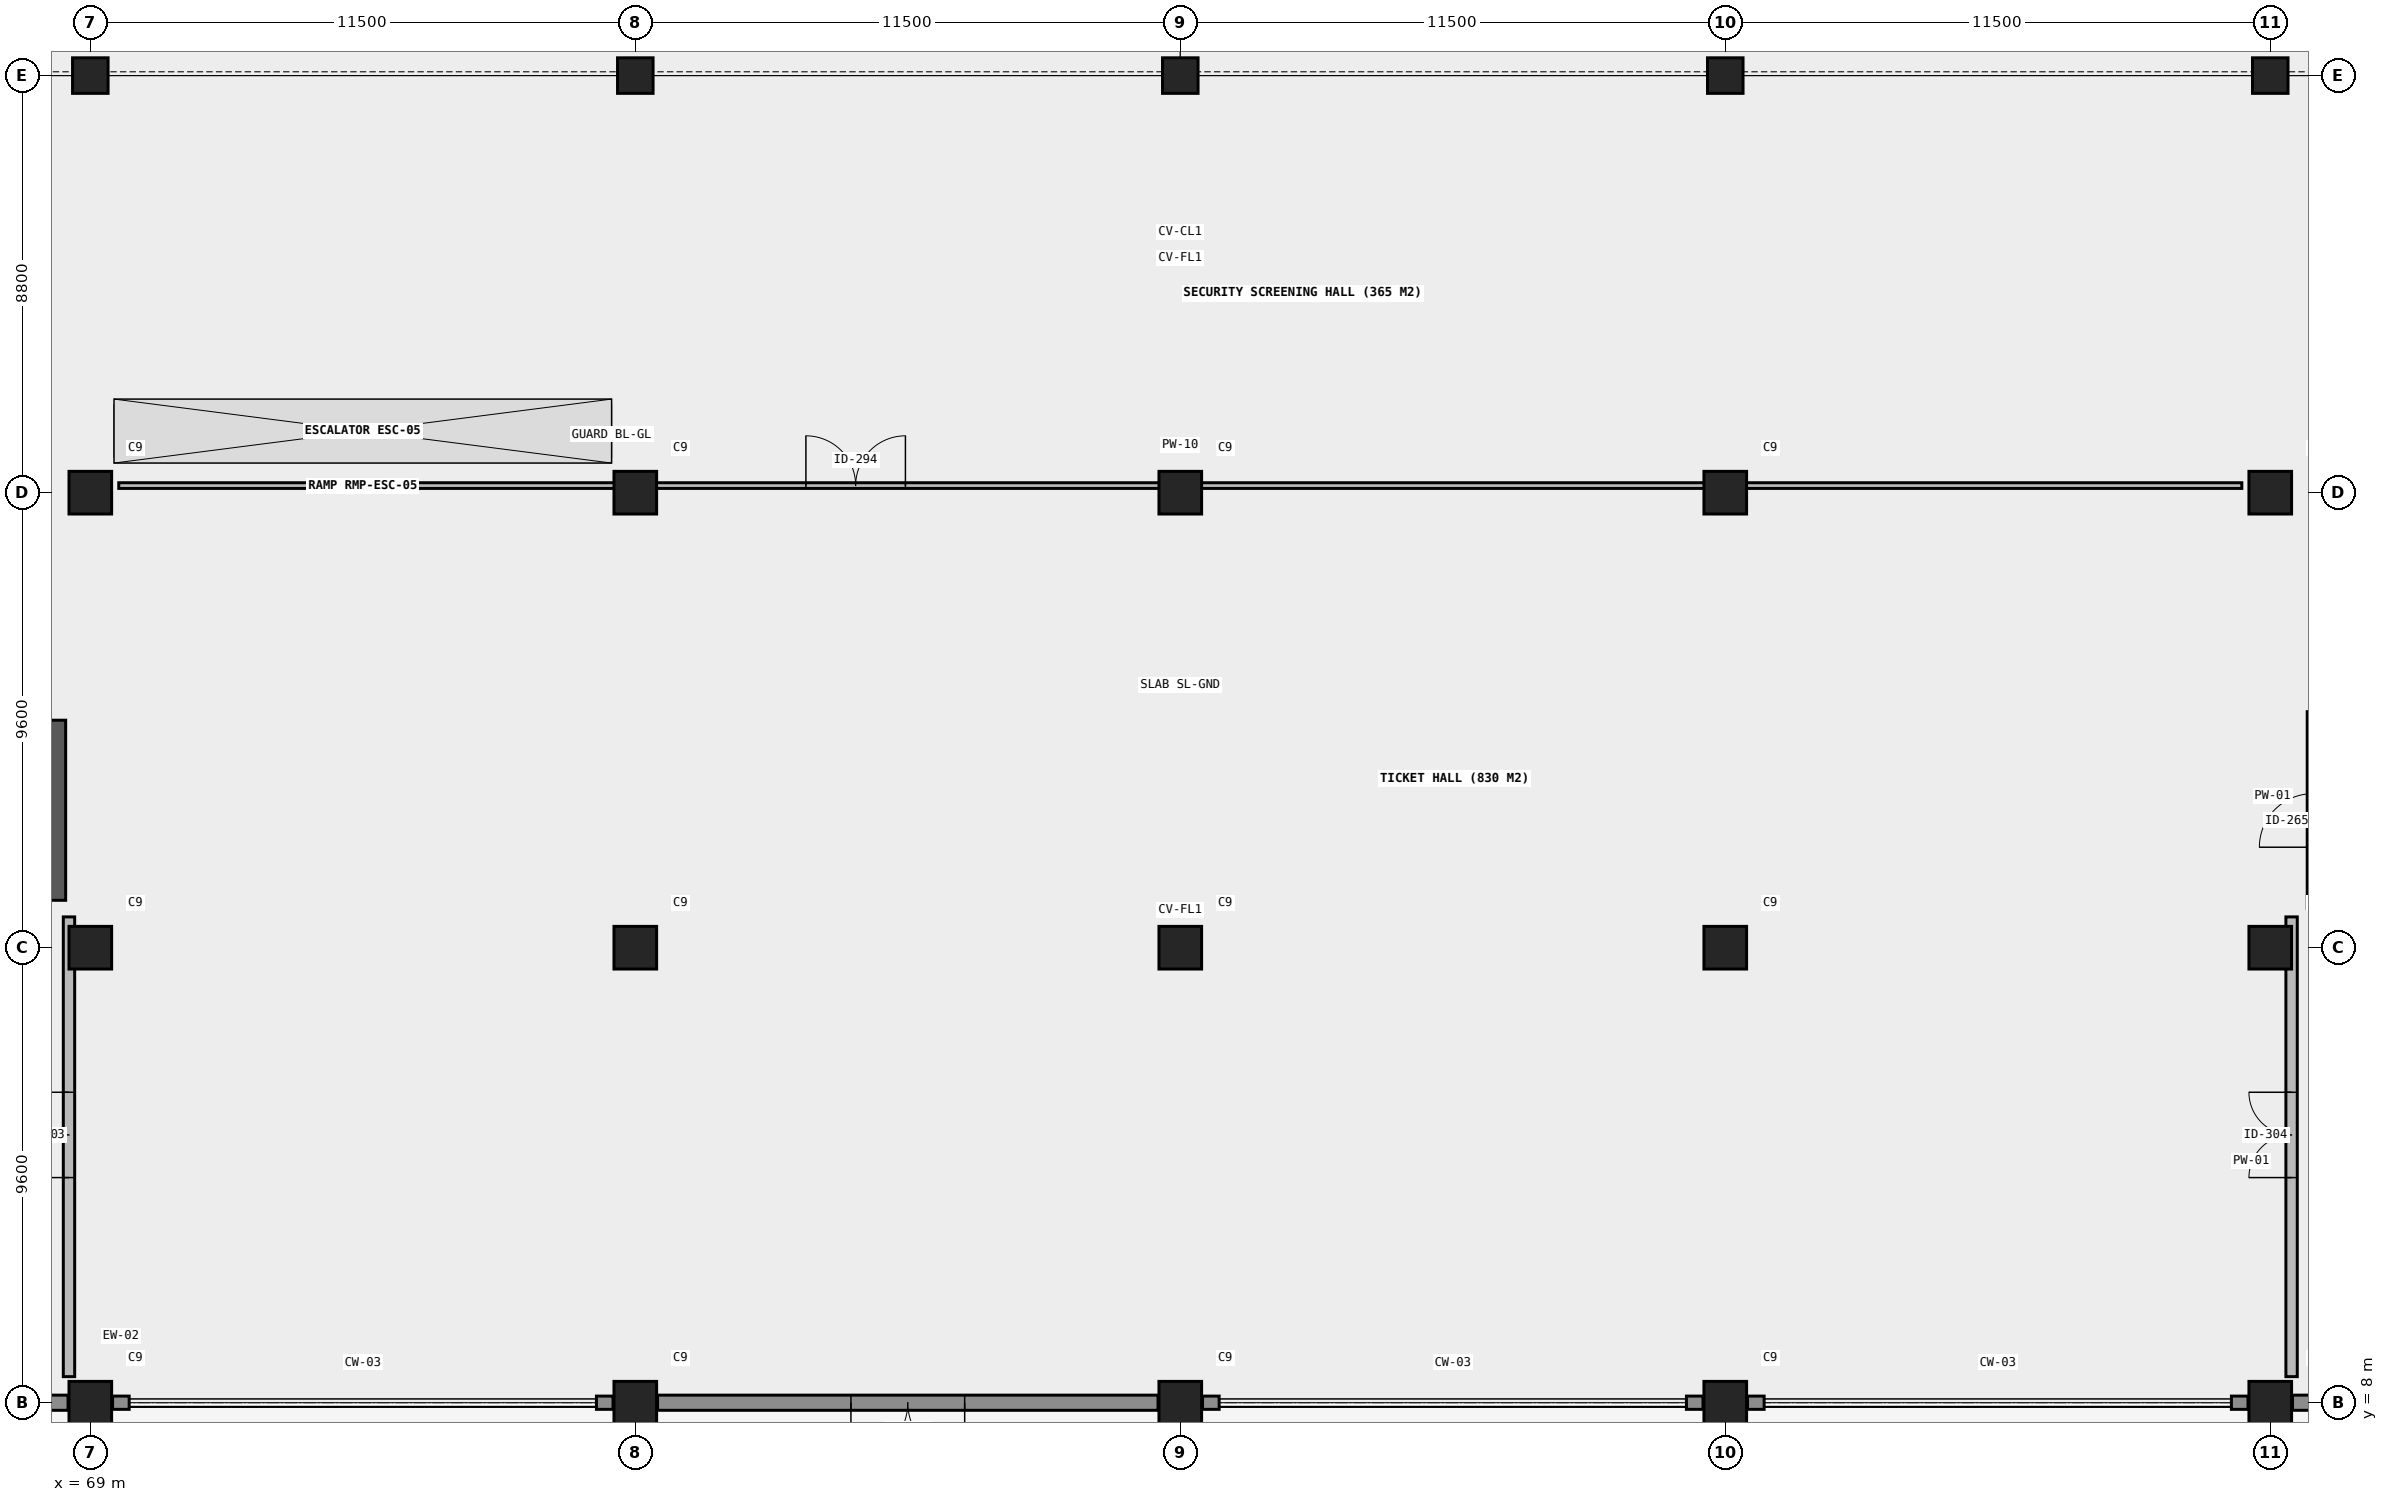
"""IFC4 building model, lengths in metres.
Left out: names, types, materials, properties, quantities, classifications, styles, units other than length and angle.
Written with IfcOpenShell. Run it as: python <this file> out.ifc"""

import sys

from ifc_helpers import new_model, si_unit, direction, frame, frame_2d, origin, origin_2d, place, context, subcontext, project, spatial, rectangle, circle, extrude, element, fill, save


model = new_model("IFC4")
c1 = context("Model", 3, precision=1e-05, world=origin(), true_north=direction((0.0, 1.0)))
c2 = subcontext(c1, "Body", "Model", "MODEL_VIEW")
j1 = project(units=[si_unit("LENGTHUNIT", "METRE"), si_unit("PLANEANGLEUNIT", "RADIAN")], contexts=[c1])
p1 = place(None, origin())
s1 = spatial("IfcSite", under=j1, at=p1, CompositionType="ELEMENT")
p2 = place(p1, origin())
s2 = spatial("IfcBuilding", under=s1, at=p2, CompositionType="ELEMENT")
p3 = place(p2, origin())
s3 = spatial("IfcBuildingStorey", under=s2, at=p3, CompositionType="ELEMENT", Elevation=0.0)
for number, where, z_axis, x_axis in (
    (1, (69.0, 8.0, 0.0), (0.0, 0.0, 1.0), (1.0, 0.0, 0.0)),
    (2, (69.0, 17.6, 0.0), (0.0, 0.0, 1.0), (1.0, 0.0, 0.0)),
    (3, (69.0, 27.2, 0.0), (0.0, 0.0, 1.0), (1.0, 0.0, 0.0)),
):
    element("IfcColumn", number, at=place(p3, frame(where, z_axis=z_axis, x_axis=x_axis)), inside=s3, PredefinedType="COLUMN", context=c2, shape_type="SweptSolid", body=[
        extrude(circle(Radius=0.45, at=origin_2d()), origin(), (0.0, 0.0, 1.0), 4.2),
    ])
p4 = place(p3, frame((69.0, 36.0, 0.0), z_axis=(0.0, 0.0, 1.0), x_axis=(1.0, 0.0, 0.0)))
e4 = element("IfcColumn", 4, at=p4, inside=s3, PredefinedType="COLUMN", context=c2, shape_type="SweptSolid", body=[
    extrude(rectangle(XDim=0.75, YDim=0.75, at=origin_2d()), origin(), (0.0, 0.0, 1.0), 4.2),
])
for number, where, z_axis, x_axis in (
    (5, (80.5, 8.0, 0.0), (0.0, 0.0, 1.0), (1.0, 0.0, 0.0)),
    (6, (80.5, 17.6, 0.0), (0.0, 0.0, 1.0), (1.0, 0.0, 0.0)),
    (7, (80.5, 27.2, 0.0), (0.0, 0.0, 1.0), (1.0, 0.0, 0.0)),
):
    element("IfcColumn", number, at=place(p3, frame(where, z_axis=z_axis, x_axis=x_axis)), inside=s3, PredefinedType="COLUMN", context=c2, shape_type="SweptSolid", body=[
        extrude(circle(Radius=0.45, at=origin_2d()), origin(), (0.0, 0.0, 1.0), 4.2),
    ])
p5 = place(p3, frame((80.5, 36.0, 0.0), z_axis=(0.0, 0.0, 1.0), x_axis=(1.0, 0.0, 0.0)))
e8 = element("IfcColumn", 8, at=p5, inside=s3, PredefinedType="COLUMN", context=c2, shape_type="SweptSolid", body=[
    extrude(rectangle(XDim=0.75, YDim=0.75, at=origin_2d()), origin(), (0.0, 0.0, 1.0), 4.2),
])
for number, where, z_axis, x_axis in (
    (9, (92.0, 8.0, 0.0), (0.0, 0.0, 1.0), (1.0, 0.0, 0.0)),
    (10, (92.0, 17.6, 0.0), (0.0, 0.0, 1.0), (1.0, 0.0, 0.0)),
    (11, (92.0, 27.2, 0.0), (0.0, 0.0, 1.0), (1.0, 0.0, 0.0)),
):
    element("IfcColumn", number, at=place(p3, frame(where, z_axis=z_axis, x_axis=x_axis)), inside=s3, PredefinedType="COLUMN", context=c2, shape_type="SweptSolid", body=[
        extrude(circle(Radius=0.45, at=origin_2d()), origin(), (0.0, 0.0, 1.0), 4.2),
    ])
p6 = place(p3, frame((92.0, 36.0, 0.0), z_axis=(0.0, 0.0, 1.0), x_axis=(1.0, 0.0, 0.0)))
e12 = element("IfcColumn", 12, at=p6, inside=s3, PredefinedType="COLUMN", context=c2, shape_type="SweptSolid", body=[
    extrude(rectangle(XDim=0.75, YDim=0.75, at=origin_2d()), origin(), (0.0, 0.0, 1.0), 4.2),
])
for number, where, z_axis, x_axis in (
    (13, (103.5, 8.0, 0.0), (0.0, 0.0, 1.0), (1.0, 0.0, 0.0)),
    (14, (103.5, 17.6, 0.0), (0.0, 0.0, 1.0), (1.0, 0.0, 0.0)),
    (15, (103.5, 27.2, 0.0), (0.0, 0.0, 1.0), (1.0, 0.0, 0.0)),
):
    element("IfcColumn", number, at=place(p3, frame(where, z_axis=z_axis, x_axis=x_axis)), inside=s3, PredefinedType="COLUMN", context=c2, shape_type="SweptSolid", body=[
        extrude(circle(Radius=0.45, at=origin_2d()), origin(), (0.0, 0.0, 1.0), 4.2),
    ])
p7 = place(p3, frame((103.5, 36.0, 0.0), z_axis=(0.0, 0.0, 1.0), x_axis=(1.0, 0.0, 0.0)))
e16 = element("IfcColumn", 16, at=p7, inside=s3, PredefinedType="COLUMN", context=c2, shape_type="SweptSolid", body=[
    extrude(rectangle(XDim=0.75, YDim=0.75, at=origin_2d()), origin(), (0.0, 0.0, 1.0), 4.2),
])
for number, where, z_axis, x_axis in (
    (17, (115.0, 8.0, 0.0), (0.0, 0.0, 1.0), (1.0, 0.0, 0.0)),
    (18, (115.0, 17.6, 0.0), (0.0, 0.0, 1.0), (1.0, 0.0, 0.0)),
    (19, (115.0, 27.2, 0.0), (0.0, 0.0, 1.0), (1.0, 0.0, 0.0)),
):
    element("IfcColumn", number, at=place(p3, frame(where, z_axis=z_axis, x_axis=x_axis)), inside=s3, PredefinedType="COLUMN", context=c2, shape_type="SweptSolid", body=[
        extrude(circle(Radius=0.45, at=origin_2d()), origin(), (0.0, 0.0, 1.0), 4.2),
    ])
p8 = place(p3, frame((115.0, 36.0, 0.0), z_axis=(0.0, 0.0, 1.0), x_axis=(1.0, 0.0, 0.0)))
e20 = element("IfcColumn", 20, at=p8, inside=s3, PredefinedType="COLUMN", context=c2, shape_type="SweptSolid", body=[
    extrude(rectangle(XDim=0.75, YDim=0.75, at=origin_2d()), origin(), (0.0, 0.0, 1.0), 4.2),
])
p9 = place(p3, frame((68.29, 18.6, 0.0), z_axis=(0.0, 0.0, 1.0), x_axis=(0.0, 1.0, 0.0)))
e21 = element("IfcWall", 21, at=p9, inside=s3, PredefinedType="SHEAR", context=c2, shape_type="SweptSolid", body=[
    extrude(rectangle(XDim=3.8, YDim=0.38, at=frame_2d((1.9, 0.0))), origin(), (0.0, 0.0, 1.0), 4.2),
])
p10 = place(p3, frame((57.97, 8.0, 0.0), z_axis=(0.0, 0.0, 1.0), x_axis=(1.0, 0.0, 0.0)))
e22 = element("IfcWall", 22, at=p10, inside=s3, PredefinedType="SOLIDWALL", context=c2, shape_type="SweptSolid", body=[
    extrude(rectangle(XDim=10.56, YDim=0.32, at=frame_2d((5.28, 0.0))), origin(), (0.0, 0.0, 1.0), 3.0),
])
p11 = place(p10, frame((4.08, 0.0, 0.0)))
e23 = element("IfcOpeningElement", 23, at=p11, cuts=e22, PredefinedType="OPENING", context=c2, shape_type="SweptSolid", body=[
    extrude(rectangle(XDim=2.4, YDim=2.6, at=frame_2d((1.2, 1.3))), frame((0.0, 0.17, 0.0), z_axis=(0.0, -1.0, 0.0), x_axis=(1.0, 0.0, 0.0)), (0.0, 0.0, 1.0), 0.34),
])
for number, where, z_axis, x_axis in (
    (24, (69.47, 8.0, 0.0), (0.0, 0.0, 1.0), (1.0, 0.0, 0.0)),
    (25, (79.68, 8.0, 0.0), (0.0, 0.0, 1.0), (1.0, 0.0, 0.0)),
):
    element("IfcWall", number, at=place(p3, frame(where, z_axis=z_axis, x_axis=x_axis)), inside=s3, PredefinedType="SOLIDWALL", context=c2, shape_type="SweptSolid", body=[
        extrude(rectangle(XDim=0.35, YDim=0.28, at=frame_2d((0.175, 0.0))), origin(), (0.0, 0.0, 1.0), 3.88),
    ])
p12 = place(p3, frame((80.97, 8.0, 0.0), z_axis=(0.0, 0.0, 1.0), x_axis=(1.0, 0.0, 0.0)))
e26 = element("IfcWall", 26, at=p12, inside=s3, PredefinedType="SOLIDWALL", context=c2, shape_type="SweptSolid", body=[
    extrude(rectangle(XDim=10.56, YDim=0.32, at=frame_2d((5.28, 0.0))), origin(), (0.0, 0.0, 1.0), 3.88),
])
p13 = place(p12, frame((4.08, 0.0, 0.0)))
e27 = element("IfcOpeningElement", 27, at=p13, cuts=e26, PredefinedType="OPENING", context=c2, shape_type="SweptSolid", body=[
    extrude(rectangle(XDim=2.4, YDim=2.6, at=frame_2d((1.2, 1.3))), frame((0.0, 0.17, 0.0), z_axis=(0.0, -1.0, 0.0), x_axis=(1.0, 0.0, 0.0)), (0.0, 0.0, 1.0), 0.34),
])
for number, where, z_axis, x_axis in (
    (28, (92.47, 8.0, 0.0), (0.0, 0.0, 1.0), (1.0, 0.0, 0.0)),
    (29, (102.68, 8.0, 0.0), (0.0, 0.0, 1.0), (1.0, 0.0, 0.0)),
    (30, (103.97, 8.0, 0.0), (0.0, 0.0, 1.0), (1.0, 0.0, 0.0)),
    (31, (114.18, 8.0, 0.0), (0.0, 0.0, 1.0), (1.0, 0.0, 0.0)),
):
    element("IfcWall", number, at=place(p3, frame(where, z_axis=z_axis, x_axis=x_axis)), inside=s3, PredefinedType="SOLIDWALL", context=c2, shape_type="SweptSolid", body=[
        extrude(rectangle(XDim=0.35, YDim=0.28, at=frame_2d((0.175, 0.0))), origin(), (0.0, 0.0, 1.0), 3.88),
    ])
p14 = place(p3, frame((115.47, 8.0, 0.0), z_axis=(0.0, 0.0, 1.0), x_axis=(1.0, 0.0, 0.0)))
e32 = element("IfcWall", 32, at=p14, inside=s3, PredefinedType="SOLIDWALL", context=c2, shape_type="SweptSolid", body=[
    extrude(rectangle(XDim=10.56, YDim=0.32, at=frame_2d((5.28, 0.0))), origin(), (0.0, 0.0, 1.0), 3.0),
])
p15 = place(p14, frame((4.08, 0.0, 0.0)))
e33 = element("IfcOpeningElement", 33, at=p15, cuts=e32, PredefinedType="OPENING", context=c2, shape_type="SweptSolid", body=[
    extrude(rectangle(XDim=2.4, YDim=2.6, at=frame_2d((1.2, 1.3))), frame((0.0, 0.17, 0.0), z_axis=(0.0, -1.0, 0.0), x_axis=(1.0, 0.0, 0.0)), (0.0, 0.0, 1.0), 0.34),
])
p16 = place(p3, frame((115.9, 18.42, 0.0), z_axis=(0.0, 0.0, 1.0), x_axis=(0.0, 1.0, 0.0)))
e34 = element("IfcWall", 34, at=p16, inside=s3, PredefinedType="SOLIDWALL", context=c2, shape_type="SweptSolid", body=[
    extrude(rectangle(XDim=4.16, YDim=0.24, at=frame_2d((2.08, 0.0))), origin(), (0.0, 0.0, 1.0), 3.88),
])
p17 = place(p16, frame((1.3, 0.0, 0.0)))
e35 = element("IfcOpeningElement", 35, at=p17, cuts=e34, PredefinedType="OPENING", context=c2, shape_type="SweptSolid", body=[
    extrude(rectangle(XDim=1.13, YDim=2.15, at=frame_2d((0.565, 1.075))), frame((0.0, 0.13, 0.0), z_axis=(0.0, -1.0, 0.0), x_axis=(1.0, 0.0, 0.0)), (0.0, 0.0, 1.0), 0.26),
])
p18 = place(p3, frame((69.6, 27.35, 0.0), z_axis=(0.0, 0.0, 1.0), x_axis=(1.0, 0.0, 0.0)))
e36 = element("IfcWall", 36, at=p18, inside=s3, PredefinedType="MOVABLE", context=c2, shape_type="SweptSolid", body=[
    extrude(rectangle(XDim=44.8, YDim=0.12, at=frame_2d((22.4, 0.0))), origin(), (0.0, 0.0, 1.0), 3.0),
])
p19 = place(p18, frame((14.5, 0.0, 0.0)))
e37 = element("IfcOpeningElement", 37, at=p19, cuts=e36, PredefinedType="OPENING", context=c2, shape_type="SweptSolid", body=[
    extrude(rectangle(XDim=2.1, YDim=2.35, at=frame_2d((1.05, 1.175))), frame((0.0, 0.07, 0.0), z_axis=(0.0, -1.0, 0.0), x_axis=(1.0, 0.0, 0.0)), (0.0, 0.0, 1.0), 0.14),
])
p20 = place(p3, frame((68.55, 8.55, 0.0), z_axis=(0.0, 0.0, 1.0), x_axis=(0.0, 1.0, 0.0)))
e38 = element("IfcWall", 38, at=p20, inside=s3, PredefinedType="SOLIDWALL", context=c2, shape_type="SweptSolid", body=[
    extrude(rectangle(XDim=9.7, YDim=0.24, at=frame_2d((4.85, 0.0))), origin(), (0.0, 0.0, 1.0), 3.88),
])
p21 = place(p20, frame((4.2, 0.0, 0.0)))
e39 = element("IfcOpeningElement", 39, at=p21, cuts=e38, PredefinedType="OPENING", context=c2, shape_type="SweptSolid", body=[
    extrude(rectangle(XDim=1.8, YDim=2.2, at=frame_2d((0.9, 1.1))), frame((0.0, 0.13, 0.0), z_axis=(0.0, -1.0, 0.0), x_axis=(1.0, 0.0, 0.0)), (0.0, 0.0, 1.0), 0.26),
])
p22 = place(p3, frame((115.45, 8.55, 0.0), z_axis=(0.0, 0.0, 1.0), x_axis=(0.0, 1.0, 0.0)))
e40 = element("IfcWall", 40, at=p22, inside=s3, PredefinedType="SOLIDWALL", context=c2, shape_type="SweptSolid", body=[
    extrude(rectangle(XDim=9.7, YDim=0.24, at=frame_2d((4.85, 0.0))), origin(), (0.0, 0.0, 1.0), 3.88),
])
p23 = place(p22, frame((4.2, 0.0, 0.0)))
e41 = element("IfcOpeningElement", 41, at=p23, cuts=e40, PredefinedType="OPENING", context=c2, shape_type="SweptSolid", body=[
    extrude(rectangle(XDim=1.8, YDim=2.2, at=frame_2d((0.9, 1.1))), frame((0.0, 0.13, 0.0), z_axis=(0.0, -1.0, 0.0), x_axis=(1.0, 0.0, 0.0)), (0.0, 0.0, 1.0), 0.26),
])
p24 = place(p13, frame((1.2, 0.0, 0.0), z_axis=(0.0, 0.0, 1.0), x_axis=(-1.0, 0.0, 0.0)))
e42 = element("IfcDoor", 42, at=p24, inside=s3, OperationType="DOUBLE_DOOR_SINGLE_SWING", PredefinedType="DOOR", context=c2, shape_type="SweptSolid", body=[
    extrude(rectangle(XDim=2.4, YDim=2.6, at=frame_2d((0.0, 1.3))), frame((0.0, 0.025, 0.0), z_axis=(0.0, -1.0, 0.0), x_axis=(1.0, 0.0, 0.0)), (0.0, 0.0, 1.0), 0.05),
])
fill(e27, e42)
p25 = place(p19, origin())
e43 = element("IfcDoor", 43, at=p25, inside=s3, OperationType="DOUBLE_DOOR_SINGLE_SWING", PredefinedType="DOOR", context=c2, shape_type="SweptSolid", body=[
    extrude(rectangle(XDim=2.1, YDim=2.35, at=frame_2d((1.05, 1.175))), frame((0.0, 0.025, 0.0), z_axis=(0.0, -1.0, 0.0), x_axis=(1.0, 0.0, 0.0)), (0.0, 0.0, 1.0), 0.05),
])
fill(e37, e43)
p26 = place(p21, origin())
e44 = element("IfcDoor", 44, at=p26, inside=s3, OperationType="DOUBLE_DOOR_SINGLE_SWING", PredefinedType="DOOR", context=c2, shape_type="SweptSolid", body=[
    extrude(rectangle(XDim=1.8, YDim=2.2, at=frame_2d((0.9, 1.1))), frame((0.0, 0.025, 0.0), z_axis=(0.0, -1.0, 0.0), x_axis=(1.0, 0.0, 0.0)), (0.0, 0.0, 1.0), 0.05),
])
fill(e39, e44)
p27 = place(p23, origin())
e45 = element("IfcDoor", 45, at=p27, inside=s3, OperationType="DOUBLE_DOOR_SINGLE_SWING", PredefinedType="DOOR", context=c2, shape_type="SweptSolid", body=[
    extrude(rectangle(XDim=1.8, YDim=2.2, at=frame_2d((0.9, 1.1))), frame((0.0, 0.025, 0.0), z_axis=(0.0, -1.0, 0.0), x_axis=(1.0, 0.0, 0.0)), (0.0, 0.0, 1.0), 0.05),
])
fill(e41, e45)
save(model, sys.argv[1])
